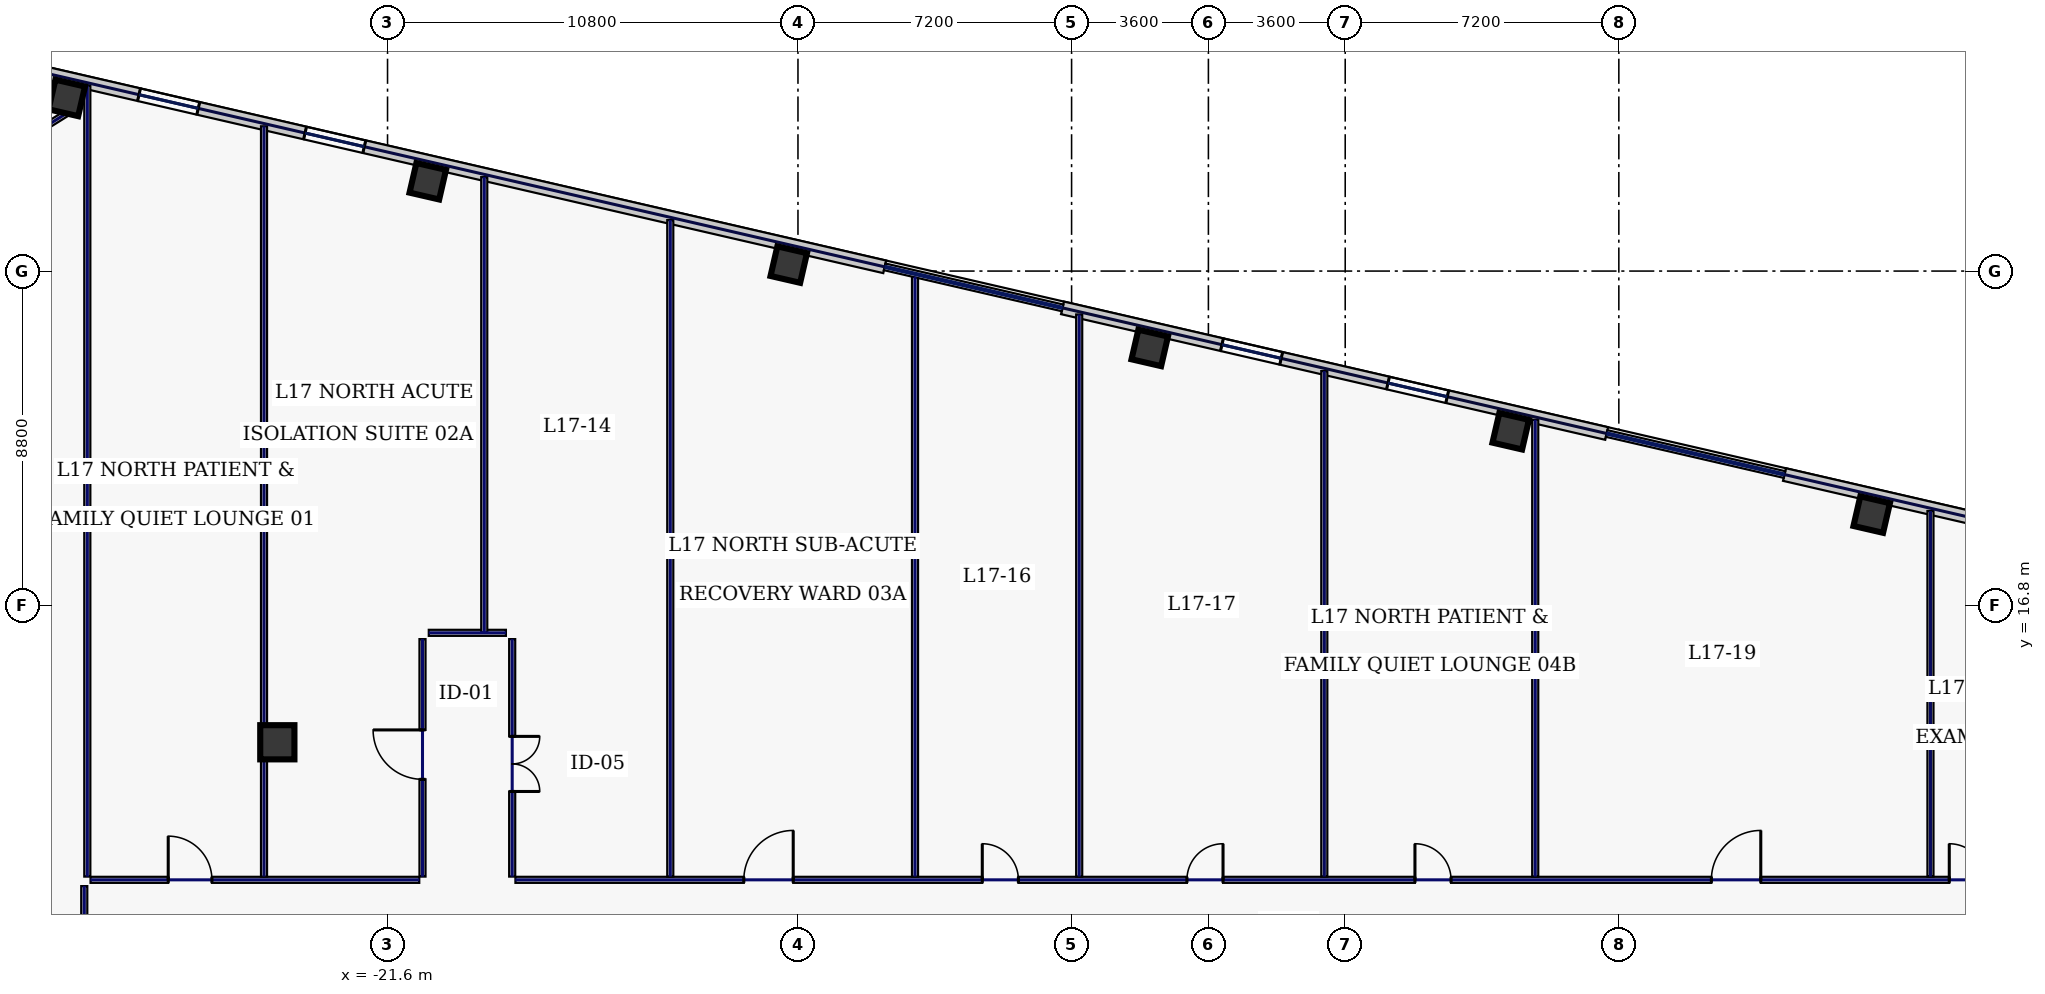
"""IFC4 building model, lengths in metres.
Left out: names, types, materials, properties, quantities, classifications, styles, units other than length and angle.
Written with IfcOpenShell. Run it as: python <this file> out.ifc"""

import sys

from ifc_helpers import new_model, si_unit, direction, frame, frame_2d, origin, origin_2d, place, context, subcontext, project, spatial, rectangle, hollow_rectangle, extrude, element, fill, save


model = new_model("IFC4")
c1 = context("Model", 3, precision=1e-05, world=origin(), true_north=direction((0.0, 1.0)))
c2 = subcontext(c1, "Body", "Model", "MODEL_VIEW")
j1 = project(units=[si_unit("LENGTHUNIT", "METRE"), si_unit("PLANEANGLEUNIT", "RADIAN")], contexts=[c1])
p1 = place(None, origin())
s1 = spatial("IfcSite", under=j1, at=p1, CompositionType="ELEMENT")
p2 = place(p1, origin())
s2 = spatial("IfcBuilding", under=s1, at=p2, CompositionType="ELEMENT")
p3 = place(p2, frame((0.0, 0.0, 79.4)))
s3 = spatial("IfcBuildingStorey", under=s2, at=p3, CompositionType="ELEMENT", Elevation=79.4)
p4 = place(p3, frame((-24.5, 13.2, 0.0), z_axis=(0.0, 0.0, 1.0), x_axis=(1.0, 0.0, 0.0)))
e1 = element("IfcColumn", 1, at=p4, inside=s3, PredefinedType="COLUMN", context=c2, shape_type="SweptSolid", body=[
    extrude(hollow_rectangle(XDim=0.9, YDim=0.9, WallThickness=0.04, at=origin_2d()), origin(), (0.0, 0.0, 1.0), 3.68),
])
for number, where, z_axis, x_axis in (
    (2, (17.454, 19.192, 0.0), (0.0, 0.0, 1.0), (0.974, -0.225, 0.0)),
    (3, (7.955, 21.385, 0.0), (0.0, 0.0, 1.0), (0.974, -0.225, 0.0)),
    (4, (-1.544, 23.578, 0.0), (0.0, 0.0, 1.0), (0.974, -0.225, 0.0)),
    (5, (-11.042, 25.771, 0.0), (0.0, 0.0, 1.0), (0.974, -0.225, 0.0)),
    (6, (-20.541, 27.964, 0.0), (0.0, 0.0, 1.0), (0.974, -0.225, 0.0)),
    (7, (-30.04, 30.156, 0.0), (0.0, 0.0, 1.0), (0.974, -0.225, 0.0)),
):
    element("IfcColumn", number, at=place(p3, frame(where, z_axis=z_axis, x_axis=x_axis)), inside=s3, PredefinedType="COLUMN", context=c2, shape_type="SweptSolid", body=[
        extrude(hollow_rectangle(XDim=0.8, YDim=0.8, WallThickness=0.036, at=origin_2d()), origin(), (0.0, 0.0, 1.0), 3.68),
    ])
p5 = place(p3, frame((37.229, 15.15, 0.0), z_axis=(0.0, 0.0, 1.0), x_axis=(-0.97436993772, 0.224951604723, 0.0)))
e8 = element("IfcWall", 8, at=p5, inside=s3, PredefinedType="STANDARD", context=c2, shape_type="SweptSolid", body=[
    extrude(rectangle(XDim=22.651, YDim=0.34, at=frame_2d((11.326, 0.0))), origin(), (0.0, 0.0, 1.0), 3.68),
])
p6 = place(p5, frame((2.512, 0.0, 0.22)))
e9 = element("IfcOpeningElement", 9, at=p6, cuts=e8, PredefinedType="OPENING", context=c2, shape_type="SweptSolid", body=[
    extrude(rectangle(XDim=1.6, YDim=1.2, at=frame_2d((0.8, 0.6))), frame((0.0, 0.18, 0.0), z_axis=(0.0, -1.0, 0.0), x_axis=(1.0, 0.0, 0.0)), (0.0, 0.0, 1.0), 0.36),
])
p7 = place(p3, frame((10.481, 21.325, 0.0), z_axis=(0.0, 0.0, 1.0), x_axis=(-0.974369353393, 0.2249541357, 0.0)))
e10 = element("IfcWall", 10, at=p7, inside=s3, PredefinedType="STANDARD", context=c2, shape_type="SweptSolid", body=[
    extrude(rectangle(XDim=14.697, YDim=0.34, at=frame_2d((7.349, 0.0))), origin(), (0.0, 0.0, 1.0), 2.075),
])
p8 = place(p7, frame((8.791, 0.0, 0.22)))
e11 = element("IfcOpeningElement", 11, at=p8, cuts=e10, PredefinedType="OPENING", context=c2, shape_type="SweptSolid", body=[
    extrude(rectangle(XDim=1.6, YDim=1.2, at=frame_2d((0.8, 0.6))), frame((0.0, 0.18, 0.0), z_axis=(0.0, -1.0, 0.0), x_axis=(1.0, 0.0, 0.0)), (0.0, 0.0, 1.0), 0.36),
])
p9 = place(p7, frame((4.306, 0.0, 0.22)))
e12 = element("IfcOpeningElement", 12, at=p9, cuts=e10, PredefinedType="OPENING", context=c2, shape_type="SweptSolid", body=[
    extrude(rectangle(XDim=1.6, YDim=1.2, at=frame_2d((0.8, 0.6))), frame((0.0, 0.18, 0.0), z_axis=(0.0, -1.0, 0.0), x_axis=(1.0, 0.0, 0.0)), (0.0, 0.0, 1.0), 0.36),
])
p10 = place(p3, frame((-8.517, 25.711, 0.0), z_axis=(0.0, 0.0, 1.0), x_axis=(-0.974372845456, 0.224939009598, 0.0)))
e13 = element("IfcWall", 13, at=p10, inside=s3, PredefinedType="STANDARD", context=c2, shape_type="SweptSolid", body=[
    extrude(rectangle(XDim=22.652, YDim=0.34, at=frame_2d((11.326, 0.0))), origin(), (0.0, 0.0, 1.0), 3.68),
])
p11 = place(p10, frame((18.539, 0.0, 0.22)))
e14 = element("IfcOpeningElement", 14, at=p11, cuts=e13, PredefinedType="OPENING", context=c2, shape_type="SweptSolid", body=[
    extrude(rectangle(XDim=1.6, YDim=1.2, at=frame_2d((0.8, 0.6))), frame((0.0, 0.18, 0.0), z_axis=(0.0, -1.0, 0.0), x_axis=(1.0, 0.0, 0.0)), (0.0, 0.0, 1.0), 0.36),
])
p12 = place(p10, frame((14.055, 0.0, 0.22)))
e15 = element("IfcOpeningElement", 15, at=p12, cuts=e13, PredefinedType="OPENING", context=c2, shape_type="SweptSolid", body=[
    extrude(rectangle(XDim=1.6, YDim=1.2, at=frame_2d((0.8, 0.6))), frame((0.0, 0.18, 0.0), z_axis=(0.0, -1.0, 0.0), x_axis=(1.0, 0.0, 0.0)), (0.0, 0.0, 1.0), 0.36),
])
p13 = place(p3, frame((-29.86, 29.868, 0.0), z_axis=(0.0, 0.0, 1.0), x_axis=(-0.848043064089, -0.529927317139, 0.0)))
e16 = element("IfcWall", 16, at=p13, inside=s3, PredefinedType="PARTITIONING", context=c2, shape_type="SweptSolid", body=[
    extrude(rectangle(XDim=7.354, YDim=0.16, at=frame_2d((3.677, 0.0))), origin(), (0.0, 0.0, 1.0), 1.475),
])
p14 = place(p3, frame((-29.58, -9.215, 0.0), z_axis=(0.0, 0.0, 1.0), x_axis=(0.0, 1.0, 0.0)))
e17 = element("IfcWall", 17, at=p14, inside=s3, PredefinedType="PARTITIONING", context=c2, shape_type="SweptSolid", body=[
    extrude(rectangle(XDim=18.63, YDim=0.16, at=frame_2d((9.315, 0.0))), origin(), (0.0, 0.0, 1.0), 3.68),
])
p15 = place(p14, frame((1.769, 0.0, 0.0)))
e18 = element("IfcOpeningElement", 18, at=p15, cuts=e17, PredefinedType="OPENING", context=c2, shape_type="SweptSolid", body=[
    extrude(rectangle(XDim=0.95, YDim=2.2, at=frame_2d((0.475, 1.1))), frame((0.0, 0.09, 0.0), z_axis=(0.0, -1.0, 0.0), x_axis=(1.0, 0.0, 0.0)), (0.0, 0.0, 1.0), 0.18),
])
p16 = place(p14, frame((5.6, 0.0, 0.0)))
e19 = element("IfcOpeningElement", 19, at=p16, cuts=e17, PredefinedType="OPENING", context=c2, shape_type="SweptSolid", body=[
    extrude(rectangle(XDim=0.95, YDim=2.2, at=frame_2d((0.475, 1.1))), frame((0.0, 0.09, 0.0), z_axis=(0.0, -1.0, 0.0), x_axis=(1.0, 0.0, 0.0)), (0.0, 0.0, 1.0), 0.18),
])
p17 = place(p14, frame((10.8, 0.0, 0.0)))
e20 = element("IfcOpeningElement", 20, at=p17, cuts=e17, PredefinedType="OPENING", context=c2, shape_type="SweptSolid", body=[
    extrude(rectangle(XDim=0.95, YDim=2.2, at=frame_2d((0.475, 1.1))), frame((0.0, 0.09, 0.0), z_axis=(0.0, -1.0, 0.0), x_axis=(1.0, 0.0, 0.0)), (0.0, 0.0, 1.0), 0.18),
])
p18 = place(p14, frame((15.981, 0.0, 0.0)))
e21 = element("IfcOpeningElement", 21, at=p18, cuts=e17, PredefinedType="OPENING", context=c2, shape_type="SweptSolid", body=[
    extrude(rectangle(XDim=0.95, YDim=2.2, at=frame_2d((0.475, 1.1))), frame((0.0, 0.09, 0.0), z_axis=(0.0, -1.0, 0.0), x_axis=(1.0, 0.0, 0.0)), (0.0, 0.0, 1.0), 0.18),
])
p19 = place(p3, frame((-29.415, 9.58, 0.0), z_axis=(0.0, 0.0, 1.0), x_axis=(1.0, 0.0, 0.0)))
e22 = element("IfcWall", 22, at=p19, inside=s3, PredefinedType="PARTITIONING", context=c2, shape_type="SweptSolid", body=[
    extrude(rectangle(XDim=8.65, YDim=0.16, at=frame_2d((4.325, 0.0))), origin(), (0.0, 0.0, 1.0), 3.68),
])
p20 = place(p19, frame((2.044, 0.0, 0.0)))
e23 = element("IfcOpeningElement", 23, at=p20, cuts=e22, PredefinedType="OPENING", context=c2, shape_type="SweptSolid", body=[
    extrude(rectangle(XDim=1.15, YDim=2.2, at=frame_2d((0.575, 1.1))), frame((0.0, 0.09, 0.0), z_axis=(0.0, -1.0, 0.0), x_axis=(1.0, 0.0, 0.0)), (0.0, 0.0, 1.0), 0.18),
])
p21 = place(p3, frame((-20.68, 9.665, 0.0), z_axis=(0.0, 0.0, 1.0), x_axis=(0.0, 1.0, 0.0)))
e24 = element("IfcWall", 24, at=p21, inside=s3, PredefinedType="PARTITIONING", context=c2, shape_type="SweptSolid", body=[
    extrude(rectangle(XDim=6.25, YDim=0.16, at=frame_2d((3.125, 0.0))), origin(), (0.0, 0.0, 1.0), 3.68),
])
p22 = place(p21, frame((2.56, 0.0, 0.0)))
e25 = element("IfcOpeningElement", 25, at=p22, cuts=e24, PredefinedType="OPENING", context=c2, shape_type="SweptSolid", body=[
    extrude(rectangle(XDim=1.3, YDim=2.2, at=frame_2d((0.65, 1.1))), frame((0.0, 0.09, 0.0), z_axis=(0.0, -1.0, 0.0), x_axis=(1.0, 0.0, 0.0)), (0.0, 0.0, 1.0), 0.18),
])
p23 = place(p3, frame((-20.515, 16.08, 0.0), z_axis=(0.0, 0.0, 1.0), x_axis=(1.0, 0.0, 0.0)))
e26 = element("IfcWall", 26, at=p23, inside=s3, PredefinedType="PARTITIONING", context=c2, shape_type="SweptSolid", body=[
    extrude(rectangle(XDim=2.03, YDim=0.16, at=frame_2d((1.015, 0.0))), origin(), (0.0, 0.0, 1.0), 3.68),
])
p24 = place(p3, frame((-18.32, 15.915, 0.0), z_axis=(0.0, 0.0, 1.0), x_axis=(0.0, -1.0, 0.0)))
e27 = element("IfcWall", 27, at=p24, inside=s3, PredefinedType="PARTITIONING", context=c2, shape_type="SweptSolid", body=[
    extrude(rectangle(XDim=6.25, YDim=0.16, at=frame_2d((3.125, 0.0))), origin(), (0.0, 0.0, 1.0), 3.68),
])
p25 = place(p24, frame((2.56, 0.0, 0.0)))
e28 = element("IfcOpeningElement", 28, at=p25, cuts=e27, PredefinedType="OPENING", context=c2, shape_type="SweptSolid", body=[
    extrude(rectangle(XDim=1.45, YDim=2.2, at=frame_2d((0.725, 1.1))), frame((0.0, 0.09, 0.0), z_axis=(0.0, -1.0, 0.0), x_axis=(1.0, 0.0, 0.0)), (0.0, 0.0, 1.0), 0.18),
])
p26 = place(p3, frame((-18.235, 9.58, 0.0), z_axis=(0.0, 0.0, 1.0), x_axis=(1.0, 0.0, 0.0)))
e29 = element("IfcWall", 29, at=p26, inside=s3, PredefinedType="PARTITIONING", context=c2, shape_type="SweptSolid", body=[
    extrude(rectangle(XDim=47.65, YDim=0.16, at=frame_2d((23.825, 0.0))), origin(), (0.0, 0.0, 1.0), 3.68),
])
p27 = place(p26, frame((6.01, 0.0, 0.0)))
e30 = element("IfcOpeningElement", 30, at=p27, cuts=e29, PredefinedType="OPENING", context=c2, shape_type="SweptSolid", body=[
    extrude(rectangle(XDim=1.3, YDim=2.2, at=frame_2d((0.65, 1.1))), frame((0.0, 0.09, 0.0), z_axis=(0.0, -1.0, 0.0), x_axis=(1.0, 0.0, 0.0)), (0.0, 0.0, 1.0), 0.18),
])
p28 = place(p26, frame((12.285, 0.0, 0.0)))
e31 = element("IfcOpeningElement", 31, at=p28, cuts=e29, PredefinedType="OPENING", context=c2, shape_type="SweptSolid", body=[
    extrude(rectangle(XDim=0.95, YDim=2.2, at=frame_2d((0.475, 1.1))), frame((0.0, 0.09, 0.0), z_axis=(0.0, -1.0, 0.0), x_axis=(1.0, 0.0, 0.0)), (0.0, 0.0, 1.0), 0.18),
])
p29 = place(p26, frame((17.67, 0.0, 0.0)))
e32 = element("IfcOpeningElement", 32, at=p29, cuts=e29, PredefinedType="OPENING", context=c2, shape_type="SweptSolid", body=[
    extrude(rectangle(XDim=0.95, YDim=2.2, at=frame_2d((0.475, 1.1))), frame((0.0, 0.09, 0.0), z_axis=(0.0, -1.0, 0.0), x_axis=(1.0, 0.0, 0.0)), (0.0, 0.0, 1.0), 0.18),
])
p30 = place(p26, frame((23.67, 0.0, 0.0)))
e33 = element("IfcOpeningElement", 33, at=p30, cuts=e29, PredefinedType="OPENING", context=c2, shape_type="SweptSolid", body=[
    extrude(rectangle(XDim=0.95, YDim=2.2, at=frame_2d((0.475, 1.1))), frame((0.0, 0.09, 0.0), z_axis=(0.0, -1.0, 0.0), x_axis=(1.0, 0.0, 0.0)), (0.0, 0.0, 1.0), 0.18),
])
p31 = place(p26, frame((31.47, 0.0, 0.0)))
e34 = element("IfcOpeningElement", 34, at=p31, cuts=e29, PredefinedType="OPENING", context=c2, shape_type="SweptSolid", body=[
    extrude(rectangle(XDim=1.3, YDim=2.2, at=frame_2d((0.65, 1.1))), frame((0.0, 0.09, 0.0), z_axis=(0.0, -1.0, 0.0), x_axis=(1.0, 0.0, 0.0)), (0.0, 0.0, 1.0), 0.18),
])
p32 = place(p26, frame((37.73, 0.0, 0.0)))
e35 = element("IfcOpeningElement", 35, at=p32, cuts=e29, PredefinedType="OPENING", context=c2, shape_type="SweptSolid", body=[
    extrude(rectangle(XDim=0.95, YDim=2.2, at=frame_2d((0.475, 1.1))), frame((0.0, 0.09, 0.0), z_axis=(0.0, -1.0, 0.0), x_axis=(1.0, 0.0, 0.0)), (0.0, 0.0, 1.0), 0.18),
])
p33 = place(p26, frame((45.786, 0.0, 0.0)))
e36 = element("IfcOpeningElement", 36, at=p33, cuts=e29, PredefinedType="OPENING", context=c2, shape_type="SweptSolid", body=[
    extrude(rectangle(XDim=0.95, YDim=2.2, at=frame_2d((0.475, 1.1))), frame((0.0, 0.09, 0.0), z_axis=(0.0, -1.0, 0.0), x_axis=(1.0, 0.0, 0.0)), (0.0, 0.0, 1.0), 0.18),
])
p34 = place(p3, frame((-29.5, 9.665, 0.0), z_axis=(0.0, 0.0, 1.0), x_axis=(0.0, 1.0, 0.0)))
e37 = element("IfcWall", 37, at=p34, inside=s3, PredefinedType="PARTITIONING", context=c2, shape_type="SweptSolid", body=[
    extrude(rectangle(XDim=20.819, YDim=0.16, at=frame_2d((10.409, 0.0))), origin(), (0.0, 0.0, 1.0), 3.68),
])
p35 = place(p3, frame((-24.85, 9.665, 0.0), z_axis=(0.0, 0.0, 1.0), x_axis=(0.0, 1.0, 0.0)))
e38 = element("IfcWall", 38, at=p35, inside=s3, PredefinedType="PARTITIONING", context=c2, shape_type="SweptSolid", body=[
    extrude(rectangle(XDim=19.745, YDim=0.16, at=frame_2d((9.873, 0.0))), origin(), (0.0, 0.0, 1.0), 1.475),
])
p36 = place(p3, frame((-14.16, 9.665, 0.0), z_axis=(0.0, 0.0, 1.0), x_axis=(0.0, 1.0, 0.0)))
e39 = element("IfcWall", 39, at=p36, inside=s3, PredefinedType="PARTITIONING", context=c2, shape_type="SweptSolid", body=[
    extrude(rectangle(XDim=17.277, YDim=0.16, at=frame_2d((8.639, 0.0))), origin(), (0.0, 0.0, 1.0), 3.68),
])
p37 = place(p3, frame((-3.4, 9.665, 0.0), z_axis=(0.0, 0.0, 1.0), x_axis=(0.0, 1.0, 0.0)))
e40 = element("IfcWall", 40, at=p37, inside=s3, PredefinedType="PARTITIONING", context=c2, shape_type="SweptSolid", body=[
    extrude(rectangle(XDim=14.793, YDim=0.16, at=frame_2d((7.396, 0.0))), origin(), (0.0, 0.0, 1.0), 3.68),
])
p38 = place(p3, frame((8.6, 9.665, 0.0), z_axis=(0.0, 0.0, 1.0), x_axis=(0.0, 1.0, 0.0)))
e41 = element("IfcWall", 41, at=p38, inside=s3, PredefinedType="PARTITIONING", context=c2, shape_type="SweptSolid", body=[
    extrude(rectangle(XDim=12.022, YDim=0.16, at=frame_2d((6.011, 0.0))), origin(), (0.0, 0.0, 1.0), 3.68),
])
p39 = place(p3, frame((19.0, 9.665, 0.0), z_axis=(0.0, 0.0, 1.0), x_axis=(0.0, 1.0, 0.0)))
e42 = element("IfcWall", 42, at=p39, inside=s3, PredefinedType="PARTITIONING", context=c2, shape_type="SweptSolid", body=[
    extrude(rectangle(XDim=9.622, YDim=0.16, at=frame_2d((4.811, 0.0))), origin(), (0.0, 0.0, 1.0), 1.475),
])
p40 = place(p3, frame((-19.055, 16.085, 0.0), z_axis=(0.0, 0.0, 1.0), x_axis=(0.0, 1.0, 0.0)))
e43 = element("IfcWall", 43, at=p40, inside=s3, PredefinedType="PARTITIONING", context=c2, shape_type="SweptSolid", body=[
    extrude(rectangle(XDim=11.987, YDim=0.16, at=frame_2d((5.994, 0.0))), origin(), (0.0, 0.0, 1.0), 3.68),
])
p41 = place(p3, frame((-7.72, 9.665, 0.0), z_axis=(0.0, 0.0, 1.0), x_axis=(0.0, 1.0, 0.0)))
e44 = element("IfcWall", 44, at=p41, inside=s3, PredefinedType="PARTITIONING", context=c2, shape_type="SweptSolid", body=[
    extrude(rectangle(XDim=15.79, YDim=0.16, at=frame_2d((7.895, 0.0))), origin(), (0.0, 0.0, 1.0), 3.68),
])
p42 = place(p3, frame((3.05, 9.665, 0.0), z_axis=(0.0, 0.0, 1.0), x_axis=(0.0, 1.0, 0.0)))
e45 = element("IfcWall", 45, at=p42, inside=s3, PredefinedType="PARTITIONING", context=c2, shape_type="SweptSolid", body=[
    extrude(rectangle(XDim=13.304, YDim=0.16, at=frame_2d((6.652, 0.0))), origin(), (0.0, 0.0, 1.0), 1.475),
])
p43 = place(p8, origin())
e46 = element("IfcWindow", 46, at=p43, inside=s3, PartitioningType="SINGLE_PANEL", PredefinedType="WINDOW", context=c2, shape_type="SweptSolid", body=[
    extrude(rectangle(XDim=1.6, YDim=1.2, at=frame_2d((0.8, 0.6))), frame((0.0, 0.03, 0.0), z_axis=(0.0, -1.0, 0.0), x_axis=(1.0, 0.0, 0.0)), (0.0, 0.0, 1.0), 0.06),
])
fill(e11, e46)
p44 = place(p9, origin())
e47 = element("IfcWindow", 47, at=p44, inside=s3, PartitioningType="SINGLE_PANEL", PredefinedType="WINDOW", context=c2, shape_type="SweptSolid", body=[
    extrude(rectangle(XDim=1.6, YDim=1.2, at=frame_2d((0.8, 0.6))), frame((0.0, 0.03, 0.0), z_axis=(0.0, -1.0, 0.0), x_axis=(1.0, 0.0, 0.0)), (0.0, 0.0, 1.0), 0.06),
])
fill(e12, e47)
p45 = place(p11, origin())
e48 = element("IfcWindow", 48, at=p45, inside=s3, PartitioningType="SINGLE_PANEL", PredefinedType="WINDOW", context=c2, shape_type="SweptSolid", body=[
    extrude(rectangle(XDim=1.6, YDim=1.2, at=frame_2d((0.8, 0.6))), frame((0.0, 0.03, 0.0), z_axis=(0.0, -1.0, 0.0), x_axis=(1.0, 0.0, 0.0)), (0.0, 0.0, 1.0), 0.06),
])
fill(e14, e48)
p46 = place(p12, origin())
e49 = element("IfcWindow", 49, at=p46, inside=s3, PartitioningType="SINGLE_PANEL", PredefinedType="WINDOW", context=c2, shape_type="SweptSolid", body=[
    extrude(rectangle(XDim=1.6, YDim=1.2, at=frame_2d((0.8, 0.6))), frame((0.0, 0.03, 0.0), z_axis=(0.0, -1.0, 0.0), x_axis=(1.0, 0.0, 0.0)), (0.0, 0.0, 1.0), 0.06),
])
fill(e15, e49)
p47 = place(p20, origin())
e50 = element("IfcDoor", 50, at=p47, inside=s3, OperationType="SINGLE_SWING_LEFT", PredefinedType="DOOR", context=c2, shape_type="SweptSolid", body=[
    extrude(rectangle(XDim=1.15, YDim=2.2, at=frame_2d((0.575, 1.1))), frame((0.0, 0.025, 0.0), z_axis=(0.0, -1.0, 0.0), x_axis=(1.0, 0.0, 0.0)), (0.0, 0.0, 1.0), 0.05),
])
fill(e23, e50)
p48 = place(p22, origin())
e51 = element("IfcDoor", 51, at=p48, inside=s3, OperationType="SINGLE_SWING_RIGHT", PredefinedType="DOOR", context=c2, shape_type="SweptSolid", body=[
    extrude(rectangle(XDim=1.3, YDim=2.2, at=frame_2d((0.65, 1.1))), frame((0.0, 0.025, 0.0), z_axis=(0.0, -1.0, 0.0), x_axis=(1.0, 0.0, 0.0)), (0.0, 0.0, 1.0), 0.05),
])
fill(e25, e51)
p49 = place(p25, origin())
e52 = element("IfcDoor", 52, at=p49, inside=s3, OperationType="DOUBLE_SWING_LEFT", PredefinedType="DOOR", context=c2, shape_type="SweptSolid", body=[
    extrude(rectangle(XDim=1.45, YDim=2.2, at=frame_2d((0.725, 1.1))), frame((0.0, 0.025, 0.0), z_axis=(0.0, -1.0, 0.0), x_axis=(1.0, 0.0, 0.0)), (0.0, 0.0, 1.0), 0.05),
])
fill(e28, e52)
p50 = place(p27, origin())
e53 = element("IfcDoor", 53, at=p50, inside=s3, OperationType="SINGLE_SWING_RIGHT", PredefinedType="DOOR", context=c2, shape_type="SweptSolid", body=[
    extrude(rectangle(XDim=1.3, YDim=2.2, at=frame_2d((0.65, 1.1))), frame((0.0, 0.025, 0.0), z_axis=(0.0, -1.0, 0.0), x_axis=(1.0, 0.0, 0.0)), (0.0, 0.0, 1.0), 0.05),
])
fill(e30, e53)
p51 = place(p28, origin())
e54 = element("IfcDoor", 54, at=p51, inside=s3, OperationType="SINGLE_SWING_LEFT", PredefinedType="DOOR", context=c2, shape_type="SweptSolid", body=[
    extrude(rectangle(XDim=0.95, YDim=2.2, at=frame_2d((0.475, 1.1))), frame((0.0, 0.025, 0.0), z_axis=(0.0, -1.0, 0.0), x_axis=(1.0, 0.0, 0.0)), (0.0, 0.0, 1.0), 0.05),
])
fill(e31, e54)
p52 = place(p29, origin())
e55 = element("IfcDoor", 55, at=p52, inside=s3, OperationType="SINGLE_SWING_RIGHT", PredefinedType="DOOR", context=c2, shape_type="SweptSolid", body=[
    extrude(rectangle(XDim=0.95, YDim=2.2, at=frame_2d((0.475, 1.1))), frame((0.0, 0.025, 0.0), z_axis=(0.0, -1.0, 0.0), x_axis=(1.0, 0.0, 0.0)), (0.0, 0.0, 1.0), 0.05),
])
fill(e32, e55)
p53 = place(p30, origin())
e56 = element("IfcDoor", 56, at=p53, inside=s3, OperationType="SINGLE_SWING_LEFT", PredefinedType="DOOR", context=c2, shape_type="SweptSolid", body=[
    extrude(rectangle(XDim=0.95, YDim=2.2, at=frame_2d((0.475, 1.1))), frame((0.0, 0.025, 0.0), z_axis=(0.0, -1.0, 0.0), x_axis=(1.0, 0.0, 0.0)), (0.0, 0.0, 1.0), 0.05),
])
fill(e33, e56)
p54 = place(p31, origin())
e57 = element("IfcDoor", 57, at=p54, inside=s3, OperationType="SINGLE_SWING_RIGHT", PredefinedType="DOOR", context=c2, shape_type="SweptSolid", body=[
    extrude(rectangle(XDim=1.3, YDim=2.2, at=frame_2d((0.65, 1.1))), frame((0.0, 0.025, 0.0), z_axis=(0.0, -1.0, 0.0), x_axis=(1.0, 0.0, 0.0)), (0.0, 0.0, 1.0), 0.05),
])
fill(e34, e57)
p55 = place(p32, origin())
e58 = element("IfcDoor", 58, at=p55, inside=s3, OperationType="SINGLE_SWING_LEFT", PredefinedType="DOOR", context=c2, shape_type="SweptSolid", body=[
    extrude(rectangle(XDim=0.95, YDim=2.2, at=frame_2d((0.475, 1.1))), frame((0.0, 0.025, 0.0), z_axis=(0.0, -1.0, 0.0), x_axis=(1.0, 0.0, 0.0)), (0.0, 0.0, 1.0), 0.05),
])
fill(e35, e58)
save(model, sys.argv[1])
